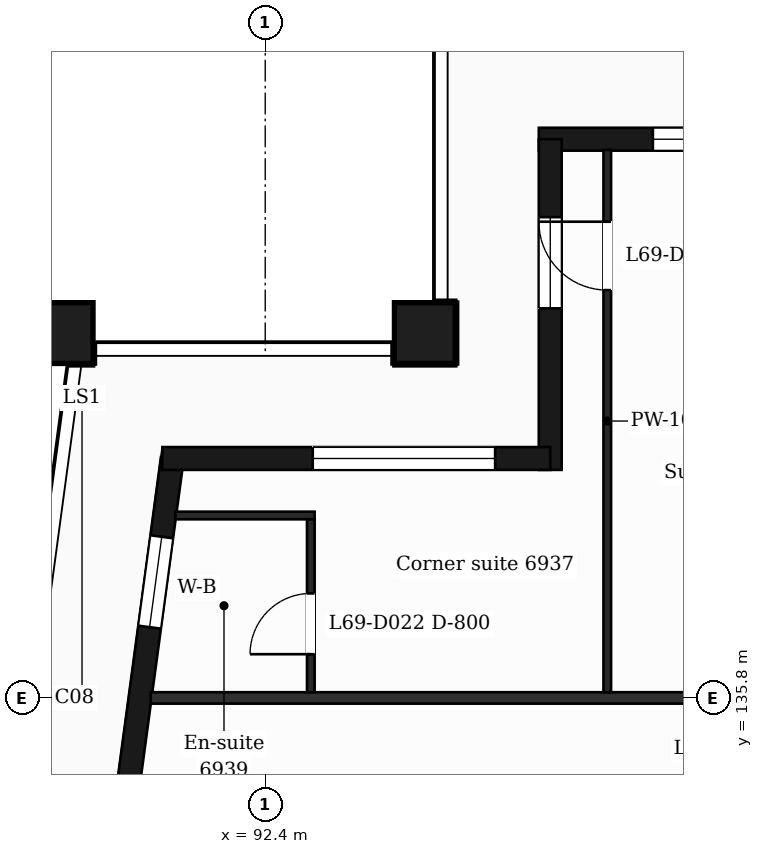
"""IFC4 building model, lengths in metres.
Left out: names, types, materials, properties, quantities, classifications, styles, units other than length and angle.
Written with IfcOpenShell. Run it as: python <this file> out.ifc"""

import sys

from ifc_helpers import new_model, si_unit, direction, frame, frame_2d, origin, origin_2d, place, context, subcontext, project, spatial, rectangle, extrude, element, fill, save


model = new_model("IFC4")
c1 = context("Model", 3, precision=1e-05, world=origin(), true_north=direction((0.0, 1.0)))
c2 = subcontext(c1, "Body", "Model", "MODEL_VIEW")
j1 = project(units=[si_unit("LENGTHUNIT", "METRE"), si_unit("PLANEANGLEUNIT", "RADIAN")], contexts=[c1])
p1 = place(None, origin())
s1 = spatial("IfcSite", under=j1, at=p1, CompositionType="ELEMENT")
p2 = place(p1, origin())
s2 = spatial("IfcBuilding", under=s1, at=p2, CompositionType="ELEMENT")
p3 = place(p2, frame((0.0, 0.0, 284.9)))
s3 = spatial("IfcBuildingStorey", under=s2, at=p3, CompositionType="ELEMENT", Elevation=284.9)
for number, where, z_axis, x_axis in (
    (1, (94.5, 140.6, 0.0), (0.0, 0.0, 1.0), (1.0, 0.0, 0.0)),
    (2, (89.735, 140.6, 0.0), (0.0, 0.0, 1.0), (1.0, 0.0, 0.0)),
):
    element("IfcColumn", number, at=place(p3, frame(where, z_axis=z_axis, x_axis=x_axis)), inside=s3, PredefinedType="COLUMN", context=c2, shape_type="SweptSolid", body=[
        extrude(rectangle(XDim=0.8, YDim=0.8, at=origin_2d()), origin(), (0.0, 0.0, 1.0), 3.7),
    ])
p4 = place(p3, frame((91.177, 138.95, 0.0), z_axis=(0.0, 0.0, 1.0), x_axis=(-0.133426664613, -0.991058689065, 0.0)))
e3 = element("IfcWall", 3, at=p4, inside=s3, PredefinedType="SOLIDWALL", context=c2, shape_type="SweptSolid", body=[
    extrude(rectangle(XDim=6.609, YDim=0.3, at=frame_2d((3.305, 0.0))), origin(), (0.0, 0.0, 1.0), 3.38),
])
p5 = place(p4, frame((1.039, 0.0, 0.9)))
e4 = element("IfcOpeningElement", 4, at=p5, cuts=e3, PredefinedType="OPENING", context=c2, shape_type="SweptSolid", body=[
    extrude(rectangle(XDim=1.2, YDim=2.1, at=frame_2d((0.6, 1.05))), frame((0.0, 0.16, 0.0), z_axis=(0.0, -1.0, 0.0), x_axis=(1.0, 0.0, 0.0)), (0.0, 0.0, 1.0), 0.32),
])
p6 = place(p4, frame((4.294, 0.0, 0.0)))
e5 = element("IfcOpeningElement", 5, at=p6, cuts=e3, PredefinedType="OPENING", context=c2, shape_type="SweptSolid", body=[
    extrude(rectangle(XDim=1.2, YDim=2.4, at=frame_2d((0.6, 1.2))), frame((0.0, 0.16, 0.0), z_axis=(0.0, -1.0, 0.0), x_axis=(1.0, 0.0, 0.0)), (0.0, 0.0, 1.0), 0.32),
])
p7 = place(p3, frame((112.5, 143.15, 0.0), z_axis=(0.0, 0.0, 1.0), x_axis=(-1.0, 0.0, 0.0)))
e6 = element("IfcWall", 6, at=p7, inside=s3, PredefinedType="SOLIDWALL", context=c2, shape_type="SweptSolid", body=[
    extrude(rectangle(XDim=16.5, YDim=0.3, at=frame_2d((8.25, 0.0))), origin(), (0.0, 0.0, 1.0), 3.38),
])
p8 = place(p7, frame((0.5, 0.0, 0.9)))
e7 = element("IfcOpeningElement", 7, at=p8, cuts=e6, PredefinedType="OPENING", context=c2, shape_type="SweptSolid", body=[
    extrude(rectangle(XDim=2.4, YDim=2.1, at=frame_2d((1.2, 1.05))), frame((0.0, 0.16, 0.0), z_axis=(0.0, -1.0, 0.0), x_axis=(1.0, 0.0, 0.0)), (0.0, 0.0, 1.0), 0.32),
])
p9 = place(p7, frame((4.2, 0.0, 0.9)))
e8 = element("IfcOpeningElement", 8, at=p9, cuts=e6, PredefinedType="OPENING", context=c2, shape_type="SweptSolid", body=[
    extrude(rectangle(XDim=2.4, YDim=2.1, at=frame_2d((1.2, 1.05))), frame((0.0, 0.16, 0.0), z_axis=(0.0, -1.0, 0.0), x_axis=(1.0, 0.0, 0.0)), (0.0, 0.0, 1.0), 0.32),
])
p10 = place(p7, frame((9.0, 0.0, 0.0)))
e9 = element("IfcOpeningElement", 9, at=p10, cuts=e6, PredefinedType="OPENING", context=c2, shape_type="SweptSolid", body=[
    extrude(rectangle(XDim=1.2, YDim=2.4, at=frame_2d((0.6, 1.2))), frame((0.0, 0.16, 0.0), z_axis=(0.0, -1.0, 0.0), x_axis=(1.0, 0.0, 0.0)), (0.0, 0.0, 1.0), 0.32),
])
p11 = place(p7, frame((12.6, 0.0, 0.9)))
e10 = element("IfcOpeningElement", 10, at=p11, cuts=e6, PredefinedType="OPENING", context=c2, shape_type="SweptSolid", body=[
    extrude(rectangle(XDim=2.4, YDim=2.1, at=frame_2d((1.2, 1.05))), frame((0.0, 0.16, 0.0), z_axis=(0.0, -1.0, 0.0), x_axis=(1.0, 0.0, 0.0)), (0.0, 0.0, 1.0), 0.32),
])
p12 = place(p3, frame((96.15, 143.15, 0.0), z_axis=(0.0, 0.0, 1.0), x_axis=(0.0, -1.0, 0.0)))
e11 = element("IfcWall", 11, at=p12, inside=s3, PredefinedType="SOLIDWALL", context=c2, shape_type="SweptSolid", body=[
    extrude(rectangle(XDim=4.35, YDim=0.3, at=frame_2d((2.175, 0.0))), origin(), (0.0, 0.0, 1.0), 3.38),
])
p13 = place(p12, frame((1.025, 0.0, 0.9)))
e12 = element("IfcOpeningElement", 12, at=p13, cuts=e11, PredefinedType="OPENING", context=c2, shape_type="SweptSolid", body=[
    extrude(rectangle(XDim=1.2, YDim=2.1, at=frame_2d((0.6, 1.05))), frame((0.0, 0.16, 0.0), z_axis=(0.0, -1.0, 0.0), x_axis=(1.0, 0.0, 0.0)), (0.0, 0.0, 1.0), 0.32),
])
p14 = place(p3, frame((96.15, 138.95, 0.0), z_axis=(0.0, 0.0, 1.0), x_axis=(-1.0, 0.0, 0.0)))
e13 = element("IfcWall", 13, at=p14, inside=s3, PredefinedType="SOLIDWALL", context=c2, shape_type="SweptSolid", body=[
    extrude(rectangle(XDim=5.104, YDim=0.3, at=frame_2d((2.552, 0.0))), origin(), (0.0, 0.0, 1.0), 3.38),
])
p15 = place(p14, frame((0.725, 0.0, 0.9)))
e14 = element("IfcOpeningElement", 14, at=p15, cuts=e13, PredefinedType="OPENING", context=c2, shape_type="SweptSolid", body=[
    extrude(rectangle(XDim=2.4, YDim=2.1, at=frame_2d((1.2, 1.05))), frame((0.0, 0.16, 0.0), z_axis=(0.0, -1.0, 0.0), x_axis=(1.0, 0.0, 0.0)), (0.0, 0.0, 1.0), 0.32),
])
p16 = place(p3, frame((90.895, 135.8, 0.0), z_axis=(0.0, 0.0, 1.0), x_axis=(1.0, 0.0, 0.0)))
e15 = element("IfcWall", 15, at=p16, inside=s3, PredefinedType="PARTITIONING", context=c2, shape_type="SweptSolid", body=[
    extrude(rectangle(XDim=45.011, YDim=0.15, at=frame_2d((22.505, 0.0))), origin(), (0.0, 0.0, 1.0), 3.38),
])
p17 = place(p16, frame((8.005, 0.0, 0.0)))
e16 = element("IfcOpeningElement", 16, at=p17, cuts=e15, PredefinedType="OPENING", context=c2, shape_type="SweptSolid", body=[
    extrude(rectangle(XDim=1.0, YDim=2.1, at=frame_2d((0.5, 1.05))), frame((0.0, 0.085, 0.0), z_axis=(0.0, -1.0, 0.0), x_axis=(1.0, 0.0, 0.0)), (0.0, 0.0, 1.0), 0.17),
])
p18 = place(p16, frame((13.605, 0.0, 0.0)))
e17 = element("IfcOpeningElement", 17, at=p18, cuts=e15, PredefinedType="OPENING", context=c2, shape_type="SweptSolid", body=[
    extrude(rectangle(XDim=1.0, YDim=2.1, at=frame_2d((0.5, 1.05))), frame((0.0, 0.085, 0.0), z_axis=(0.0, -1.0, 0.0), x_axis=(1.0, 0.0, 0.0)), (0.0, 0.0, 1.0), 0.17),
])
p19 = place(p16, frame((29.735, 0.0, 0.0)))
e18 = element("IfcOpeningElement", 18, at=p19, cuts=e15, PredefinedType="OPENING", context=c2, shape_type="SweptSolid", body=[
    extrude(rectangle(XDim=1.0, YDim=2.1, at=frame_2d((0.5, 1.05))), frame((0.0, 0.085, 0.0), z_axis=(0.0, -1.0, 0.0), x_axis=(1.0, 0.0, 0.0)), (0.0, 0.0, 1.0), 0.17),
])
p20 = place(p16, frame((37.63, 0.0, 0.0)))
e19 = element("IfcOpeningElement", 19, at=p20, cuts=e15, PredefinedType="OPENING", context=c2, shape_type="SweptSolid", body=[
    extrude(rectangle(XDim=1.0, YDim=2.1, at=frame_2d((0.5, 1.05))), frame((0.0, 0.085, 0.0), z_axis=(0.0, -1.0, 0.0), x_axis=(1.0, 0.0, 0.0)), (0.0, 0.0, 1.0), 0.17),
])
p21 = place(p3, frame((91.218, 138.2, 0.0), z_axis=(0.0, 0.0, 1.0), x_axis=(1.0, 0.0, 0.0)))
e20 = element("IfcWall", 20, at=p21, inside=s3, PredefinedType="PARTITIONING", context=c2, shape_type="SweptSolid", body=[
    extrude(rectangle(XDim=1.832, YDim=0.1, at=frame_2d((0.916, 0.0))), origin(), (0.0, 0.0, 1.0), 3.38),
])
p22 = place(p3, frame((93.0, 135.875, 0.0), z_axis=(0.0, 0.0, 1.0), x_axis=(0.0, 1.0, 0.0)))
e21 = element("IfcWall", 21, at=p22, inside=s3, PredefinedType="PARTITIONING", context=c2, shape_type="SweptSolid", body=[
    extrude(rectangle(XDim=2.275, YDim=0.1, at=frame_2d((1.137, 0.0))), origin(), (0.0, 0.0, 1.0), 3.38),
])
p23 = place(p22, frame((0.5, 0.0, 0.0)))
e22 = element("IfcOpeningElement", 22, at=p23, cuts=e21, PredefinedType="OPENING", context=c2, shape_type="SweptSolid", body=[
    extrude(rectangle(XDim=0.8, YDim=2.1, at=frame_2d((0.4, 1.05))), frame((0.0, 0.06, 0.0), z_axis=(0.0, -1.0, 0.0), x_axis=(1.0, 0.0, 0.0)), (0.0, 0.0, 1.0), 0.12),
])
p24 = place(p3, frame((96.9, 135.875, 0.0), z_axis=(0.0, 0.0, 1.0), x_axis=(0.0, 1.0, 0.0)))
e23 = element("IfcWall", 23, at=p24, inside=s3, PredefinedType="PARTITIONING", context=c2, shape_type="SweptSolid", body=[
    extrude(rectangle(XDim=7.135, YDim=0.1, at=frame_2d((3.567, 0.0))), origin(), (0.0, 0.0, 1.0), 3.38),
])
p25 = place(p24, frame((5.29, 0.0, 0.0)))
e24 = element("IfcOpeningElement", 24, at=p25, cuts=e23, PredefinedType="OPENING", context=c2, shape_type="SweptSolid", body=[
    extrude(rectangle(XDim=0.9, YDim=2.1, at=frame_2d((0.45, 1.05))), frame((0.0, 0.06, 0.0), z_axis=(0.0, -1.0, 0.0), x_axis=(1.0, 0.0, 0.0)), (0.0, 0.0, 1.0), 0.12),
])
p26 = place(p5, origin())
e25 = element("IfcWindow", 25, at=p26, inside=s3, PartitioningType="SINGLE_PANEL", PredefinedType="WINDOW", context=c2, shape_type="SweptSolid", body=[
    extrude(rectangle(XDim=1.2, YDim=2.1, at=frame_2d((0.6, 1.05))), frame((0.0, 0.03, 0.0), z_axis=(0.0, -1.0, 0.0), x_axis=(1.0, 0.0, 0.0)), (0.0, 0.0, 1.0), 0.06),
])
fill(e4, e25)
p27 = place(p11, origin())
e26 = element("IfcWindow", 26, at=p27, inside=s3, PartitioningType="SINGLE_PANEL", PredefinedType="WINDOW", context=c2, shape_type="SweptSolid", body=[
    extrude(rectangle(XDim=2.4, YDim=2.1, at=frame_2d((1.2, 1.05))), frame((0.0, 0.03, 0.0), z_axis=(0.0, -1.0, 0.0), x_axis=(1.0, 0.0, 0.0)), (0.0, 0.0, 1.0), 0.06),
])
fill(e10, e26)
p28 = place(p13, origin())
e27 = element("IfcWindow", 27, at=p28, inside=s3, PartitioningType="SINGLE_PANEL", PredefinedType="WINDOW", context=c2, shape_type="SweptSolid", body=[
    extrude(rectangle(XDim=1.2, YDim=2.1, at=frame_2d((0.6, 1.05))), frame((0.0, 0.03, 0.0), z_axis=(0.0, -1.0, 0.0), x_axis=(1.0, 0.0, 0.0)), (0.0, 0.0, 1.0), 0.06),
])
fill(e12, e27)
p29 = place(p15, origin())
e28 = element("IfcWindow", 28, at=p29, inside=s3, PartitioningType="SINGLE_PANEL", PredefinedType="WINDOW", context=c2, shape_type="SweptSolid", body=[
    extrude(rectangle(XDim=2.4, YDim=2.1, at=frame_2d((1.2, 1.05))), frame((0.0, 0.03, 0.0), z_axis=(0.0, -1.0, 0.0), x_axis=(1.0, 0.0, 0.0)), (0.0, 0.0, 1.0), 0.06),
])
fill(e14, e28)
p30 = place(p25, origin())
e29 = element("IfcDoor", 29, at=p30, inside=s3, OperationType="SINGLE_SWING_RIGHT", PredefinedType="DOOR", context=c2, shape_type="SweptSolid", body=[
    extrude(rectangle(XDim=0.9, YDim=2.1, at=frame_2d((0.45, 1.05))), frame((0.0, 0.025, 0.0), z_axis=(0.0, -1.0, 0.0), x_axis=(1.0, 0.0, 0.0)), (0.0, 0.0, 1.0), 0.05),
])
fill(e24, e29)
p31 = place(p23, origin())
e30 = element("IfcDoor", 30, at=p31, inside=s3, OperationType="SINGLE_SWING_LEFT", PredefinedType="DOOR", context=c2, shape_type="SweptSolid", body=[
    extrude(rectangle(XDim=0.8, YDim=2.1, at=frame_2d((0.4, 1.05))), frame((0.0, 0.025, 0.0), z_axis=(0.0, -1.0, 0.0), x_axis=(1.0, 0.0, 0.0)), (0.0, 0.0, 1.0), 0.05),
])
fill(e22, e30)
save(model, sys.argv[1])
